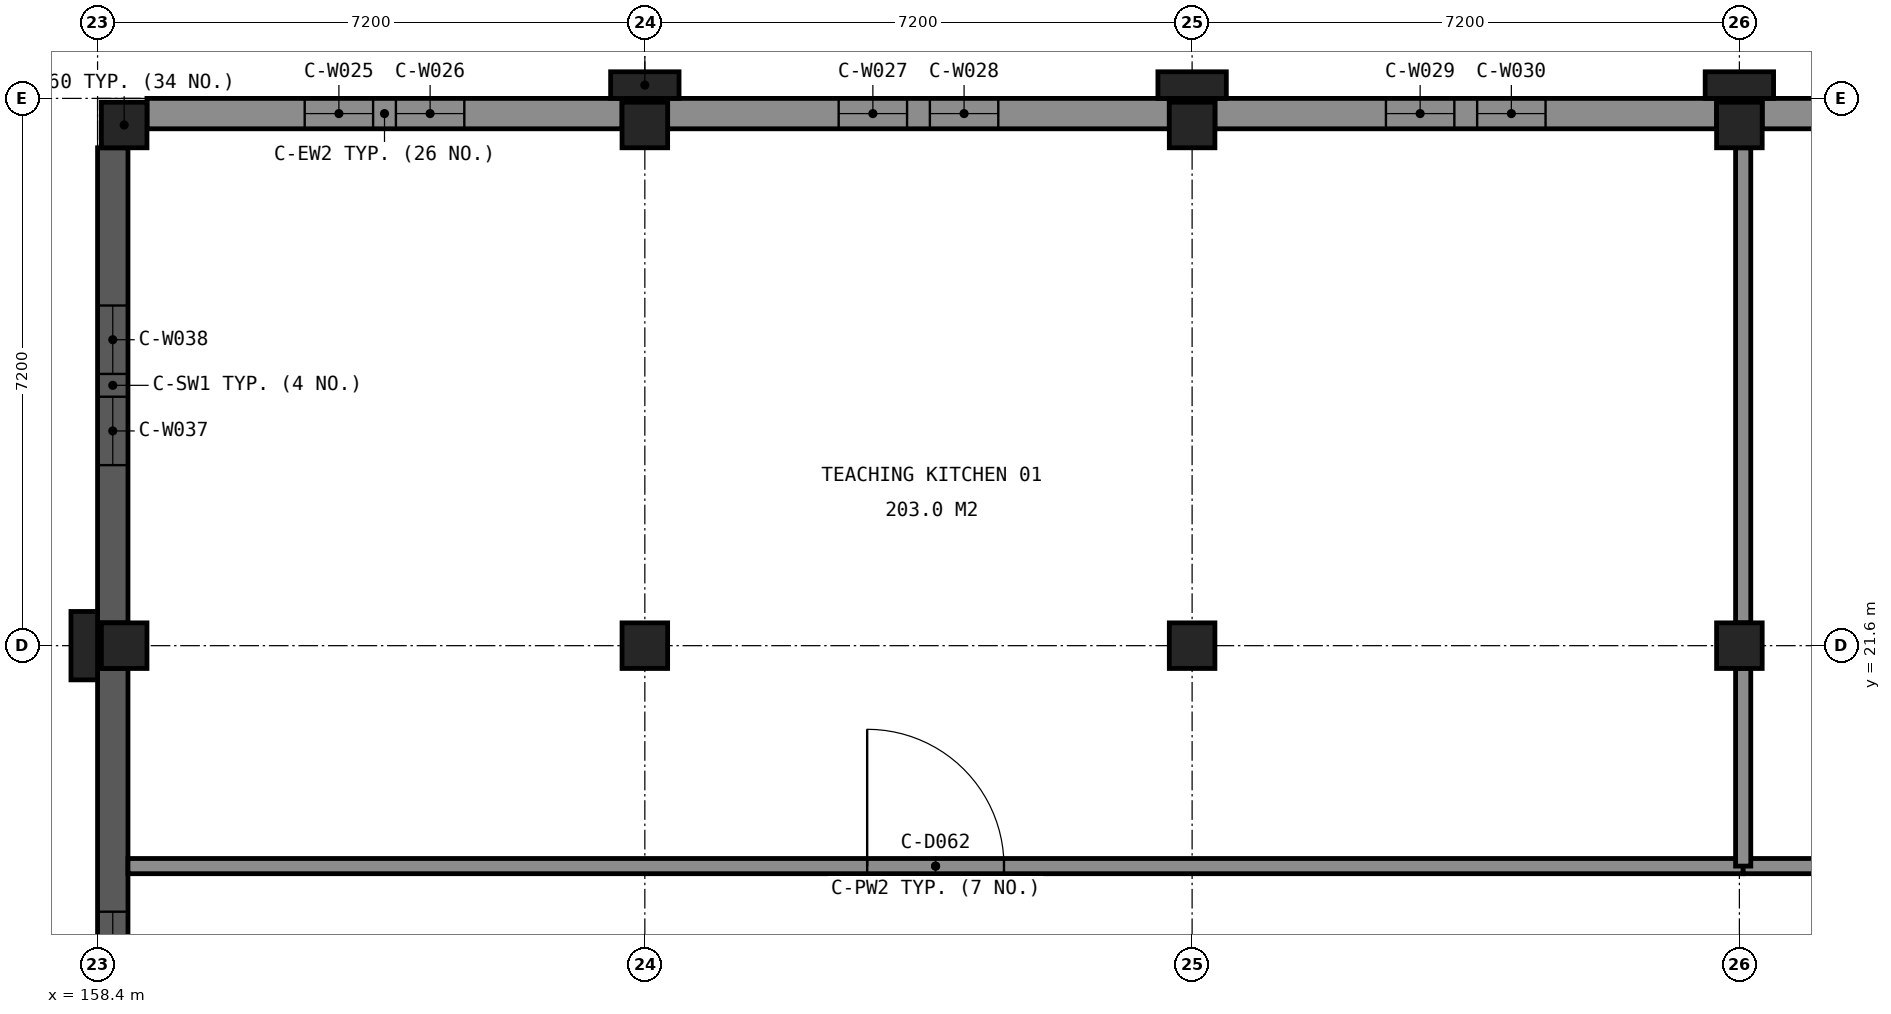
"""IFC4 building model, lengths in metres.
Left out: names, types, materials, properties, quantities, classifications, styles, units other than length and angle.
Written with IfcOpenShell. Run it as: python <this file> out.ifc"""

import sys

from ifc_helpers import new_model, si_unit, direction, frame, frame_2d, origin, origin_2d, place, context, subcontext, project, spatial, rectangle, extrude, element, fill, save


model = new_model("IFC4")
c1 = context("Model", 3, precision=1e-05, world=origin(), true_north=direction((0.0, 1.0)))
c2 = subcontext(c1, "Body", "Model", "MODEL_VIEW")
j1 = project(units=[si_unit("LENGTHUNIT", "METRE"), si_unit("PLANEANGLEUNIT", "RADIAN")], contexts=[c1])
p1 = place(None, origin())
s1 = spatial("IfcSite", under=j1, at=p1, CompositionType="ELEMENT")
p2 = place(p1, origin())
s2 = spatial("IfcBuilding", under=s1, at=p2, CompositionType="ELEMENT")
p3 = place(p2, frame((0.0, 0.0, 9.6)))
s3 = spatial("IfcBuildingStorey", under=s2, at=p3, CompositionType="ELEMENT", Elevation=9.6)
for number, where, z_axis, x_axis in (
    (1, (158.75, 28.45, 0.0), (0.0, 0.0, 1.0), (1.0, 0.0, 0.0)),
    (2, (165.6, 28.45, 0.0), (0.0, 0.0, 1.0), (1.0, 0.0, 0.0)),
    (3, (172.8, 28.45, 0.0), (0.0, 0.0, 1.0), (1.0, 0.0, 0.0)),
    (4, (180.0, 28.45, 0.0), (0.0, 0.0, 1.0), (1.0, 0.0, 0.0)),
    (5, (158.75, 21.6, 0.0), (0.0, 0.0, 1.0), (1.0, 0.0, 0.0)),
    (6, (165.6, 21.6, 0.0), (0.0, 0.0, 1.0), (1.0, 0.0, 0.0)),
    (7, (172.8, 21.6, 0.0), (0.0, 0.0, 1.0), (1.0, 0.0, 0.0)),
    (8, (180.0, 21.6, 0.0), (0.0, 0.0, 1.0), (1.0, 0.0, 0.0)),
):
    element("IfcColumn", number, at=place(p3, frame(where, z_axis=z_axis, x_axis=x_axis)), inside=s3, PredefinedType="COLUMN", context=c2, shape_type="SweptSolid", body=[
        extrude(rectangle(XDim=0.6, YDim=0.6, at=origin_2d()), origin(), (0.0, 0.0, 1.0), 4.8),
    ])
p4 = place(p3, frame((159.05, 28.6, 0.0), z_axis=(0.0, 0.0, 1.0), x_axis=(1.0, 0.0, 0.0)))
e9 = element("IfcWall", 9, at=p4, inside=s3, PredefinedType="SOLIDWALL", context=c2, shape_type="SweptSolid", body=[
    extrude(rectangle(XDim=6.25, YDim=0.4, at=frame_2d((3.125, 0.0))), origin(), (0.0, 0.0, 1.0), 3.95),
])
p5 = place(p4, frame((2.075, 0.0, 0.9)))
e10 = element("IfcOpeningElement", 10, at=p5, cuts=e9, PredefinedType="OPENING", context=c2, shape_type="SweptSolid", body=[
    extrude(rectangle(XDim=0.9, YDim=2.7, at=frame_2d((0.45, 1.35))), frame((0.0, 0.21, 0.0), z_axis=(0.0, -1.0, 0.0), x_axis=(1.0, 0.0, 0.0)), (0.0, 0.0, 1.0), 0.42),
])
p6 = place(p4, frame((3.275, 0.0, 0.9)))
e11 = element("IfcOpeningElement", 11, at=p6, cuts=e9, PredefinedType="OPENING", context=c2, shape_type="SweptSolid", body=[
    extrude(rectangle(XDim=0.9, YDim=2.7, at=frame_2d((0.45, 1.35))), frame((0.0, 0.21, 0.0), z_axis=(0.0, -1.0, 0.0), x_axis=(1.0, 0.0, 0.0)), (0.0, 0.0, 1.0), 0.42),
])
p7 = place(p3, frame((165.9, 28.6, 0.0), z_axis=(0.0, 0.0, 1.0), x_axis=(1.0, 0.0, 0.0)))
e12 = element("IfcWall", 12, at=p7, inside=s3, PredefinedType="SOLIDWALL", context=c2, shape_type="SweptSolid", body=[
    extrude(rectangle(XDim=6.6, YDim=0.4, at=frame_2d((3.3, 0.0))), origin(), (0.0, 0.0, 1.0), 3.95),
])
p8 = place(p7, frame((2.25, 0.0, 0.9)))
e13 = element("IfcOpeningElement", 13, at=p8, cuts=e12, PredefinedType="OPENING", context=c2, shape_type="SweptSolid", body=[
    extrude(rectangle(XDim=0.9, YDim=2.7, at=frame_2d((0.45, 1.35))), frame((0.0, 0.21, 0.0), z_axis=(0.0, -1.0, 0.0), x_axis=(1.0, 0.0, 0.0)), (0.0, 0.0, 1.0), 0.42),
])
p9 = place(p7, frame((3.45, 0.0, 0.9)))
e14 = element("IfcOpeningElement", 14, at=p9, cuts=e12, PredefinedType="OPENING", context=c2, shape_type="SweptSolid", body=[
    extrude(rectangle(XDim=0.9, YDim=2.7, at=frame_2d((0.45, 1.35))), frame((0.0, 0.21, 0.0), z_axis=(0.0, -1.0, 0.0), x_axis=(1.0, 0.0, 0.0)), (0.0, 0.0, 1.0), 0.42),
])
p10 = place(p3, frame((173.1, 28.6, 0.0), z_axis=(0.0, 0.0, 1.0), x_axis=(1.0, 0.0, 0.0)))
e15 = element("IfcWall", 15, at=p10, inside=s3, PredefinedType="SOLIDWALL", context=c2, shape_type="SweptSolid", body=[
    extrude(rectangle(XDim=6.6, YDim=0.4, at=frame_2d((3.3, 0.0))), origin(), (0.0, 0.0, 1.0), 3.95),
])
p11 = place(p10, frame((2.25, 0.0, 0.9)))
e16 = element("IfcOpeningElement", 16, at=p11, cuts=e15, PredefinedType="OPENING", context=c2, shape_type="SweptSolid", body=[
    extrude(rectangle(XDim=0.9, YDim=2.7, at=frame_2d((0.45, 1.35))), frame((0.0, 0.21, 0.0), z_axis=(0.0, -1.0, 0.0), x_axis=(1.0, 0.0, 0.0)), (0.0, 0.0, 1.0), 0.42),
])
p12 = place(p10, frame((3.45, 0.0, 0.9)))
e17 = element("IfcOpeningElement", 17, at=p12, cuts=e15, PredefinedType="OPENING", context=c2, shape_type="SweptSolid", body=[
    extrude(rectangle(XDim=0.9, YDim=2.7, at=frame_2d((0.45, 1.35))), frame((0.0, 0.21, 0.0), z_axis=(0.0, -1.0, 0.0), x_axis=(1.0, 0.0, 0.0)), (0.0, 0.0, 1.0), 0.42),
])
p13 = place(p3, frame((180.3, 28.6, 0.0), z_axis=(0.0, 0.0, 1.0), x_axis=(1.0, 0.0, 0.0)))
e18 = element("IfcWall", 18, at=p13, inside=s3, PredefinedType="SOLIDWALL", context=c2, shape_type="SweptSolid", body=[
    extrude(rectangle(XDim=6.6, YDim=0.4, at=frame_2d((3.3, 0.0))), origin(), (0.0, 0.0, 1.0), 3.95),
])
p14 = place(p13, frame((2.25, 0.0, 0.9)))
e19 = element("IfcOpeningElement", 19, at=p14, cuts=e18, PredefinedType="OPENING", context=c2, shape_type="SweptSolid", body=[
    extrude(rectangle(XDim=0.9, YDim=2.7, at=frame_2d((0.45, 1.35))), frame((0.0, 0.21, 0.0), z_axis=(0.0, -1.0, 0.0), x_axis=(1.0, 0.0, 0.0)), (0.0, 0.0, 1.0), 0.42),
])
p15 = place(p13, frame((3.45, 0.0, 0.9)))
e20 = element("IfcOpeningElement", 20, at=p15, cuts=e18, PredefinedType="OPENING", context=c2, shape_type="SweptSolid", body=[
    extrude(rectangle(XDim=0.9, YDim=2.7, at=frame_2d((0.45, 1.35))), frame((0.0, 0.21, 0.0), z_axis=(0.0, -1.0, 0.0), x_axis=(1.0, 0.0, 0.0)), (0.0, 0.0, 1.0), 0.42),
])
p16 = place(p3, frame((158.6, 21.9, 0.0), z_axis=(0.0, 0.0, 1.0), x_axis=(0.0, 1.0, 0.0)))
e21 = element("IfcWall", 21, at=p16, inside=s3, PredefinedType="SHEAR", context=c2, shape_type="SweptSolid", body=[
    extrude(rectangle(XDim=6.25, YDim=0.4, at=frame_2d((3.125, 0.0))), origin(), (0.0, 0.0, 1.0), 3.95),
])
p17 = place(p16, frame((2.075, 0.0, 0.9)))
e22 = element("IfcOpeningElement", 22, at=p17, cuts=e21, PredefinedType="OPENING", context=c2, shape_type="SweptSolid", body=[
    extrude(rectangle(XDim=0.9, YDim=2.7, at=frame_2d((0.45, 1.35))), frame((0.0, 0.21, 0.0), z_axis=(0.0, -1.0, 0.0), x_axis=(1.0, 0.0, 0.0)), (0.0, 0.0, 1.0), 0.42),
])
p18 = place(p16, frame((3.275, 0.0, 0.9)))
e23 = element("IfcOpeningElement", 23, at=p18, cuts=e21, PredefinedType="OPENING", context=c2, shape_type="SweptSolid", body=[
    extrude(rectangle(XDim=0.9, YDim=2.7, at=frame_2d((0.45, 1.35))), frame((0.0, 0.21, 0.0), z_axis=(0.0, -1.0, 0.0), x_axis=(1.0, 0.0, 0.0)), (0.0, 0.0, 1.0), 0.42),
])
p19 = place(p3, frame((158.6, 15.2, 0.0), z_axis=(0.0, 0.0, 1.0), x_axis=(0.0, 1.0, 0.0)))
e24 = element("IfcWall", 24, at=p19, inside=s3, PredefinedType="SHEAR", context=c2, shape_type="SweptSolid", body=[
    extrude(rectangle(XDim=6.1, YDim=0.4, at=frame_2d((3.05, 0.0))), origin(), (0.0, 0.0, 1.0), 3.95),
])
p20 = place(p19, frame((2.0, 0.0, 0.9)))
e25 = element("IfcOpeningElement", 25, at=p20, cuts=e24, PredefinedType="OPENING", context=c2, shape_type="SweptSolid", body=[
    extrude(rectangle(XDim=0.9, YDim=2.7, at=frame_2d((0.45, 1.35))), frame((0.0, 0.21, 0.0), z_axis=(0.0, -1.0, 0.0), x_axis=(1.0, 0.0, 0.0)), (0.0, 0.0, 1.0), 0.42),
])
for number, where, z_axis, x_axis in (
    (26, (165.6, 28.975, 0.0), (0.0, 0.0, 1.0), (1.0, 0.0, 0.0)),
    (27, (172.8, 28.975, 0.0), (0.0, 0.0, 1.0), (1.0, 0.0, 0.0)),
    (28, (180.0, 28.975, 0.0), (0.0, 0.0, 1.0), (1.0, 0.0, 0.0)),
    (29, (158.225, 21.6, 0.0), (0.0, 0.0, 1.0), (0.0, 1.0, 0.0)),
):
    element("IfcColumn", number, at=place(p3, frame(where, z_axis=z_axis, x_axis=x_axis)), inside=s3, PredefinedType="PILASTER", context=c2, shape_type="SweptSolid", body=[
        extrude(rectangle(XDim=0.9, YDim=0.35, at=origin_2d()), origin(), (0.0, 0.0, 1.0), 4.8),
    ])
p21 = place(p3, frame((158.8, 18.7, 0.0), z_axis=(0.0, 0.0, 1.0), x_axis=(1.0, 0.0, 0.0)))
e30 = element("IfcWall", 30, at=p21, inside=s3, PredefinedType="PARTITIONING", context=c2, shape_type="SweptSolid", body=[
    extrude(rectangle(XDim=21.25, YDim=0.2, at=frame_2d((10.625, 0.0))), origin(), (0.0, 0.0, 1.0), 3.95),
])
p22 = place(p21, frame((9.725, 0.0, 0.0)))
e31 = element("IfcOpeningElement", 31, at=p22, cuts=e30, PredefinedType="OPENING", context=c2, shape_type="SweptSolid", body=[
    extrude(rectangle(XDim=1.8, YDim=2.1, at=frame_2d((0.9, 1.05))), frame((0.0, 0.11, 0.0), z_axis=(0.0, -1.0, 0.0), x_axis=(1.0, 0.0, 0.0)), (0.0, 0.0, 1.0), 0.22),
])
p23 = place(p3, frame((180.05, 18.7, 0.0), z_axis=(0.0, 0.0, 1.0), x_axis=(1.0, 0.0, 0.0)))
e32 = element("IfcWall", 32, at=p23, inside=s3, PredefinedType="PARTITIONING", context=c2, shape_type="SweptSolid", body=[
    extrude(rectangle(XDim=21.25, YDim=0.2, at=frame_2d((10.625, 0.0))), origin(), (0.0, 0.0, 1.0), 3.95),
])
p24 = place(p23, frame((9.725, 0.0, 0.0)))
e33 = element("IfcOpeningElement", 33, at=p24, cuts=e32, PredefinedType="OPENING", context=c2, shape_type="SweptSolid", body=[
    extrude(rectangle(XDim=1.8, YDim=2.1, at=frame_2d((0.9, 1.05))), frame((0.0, 0.11, 0.0), z_axis=(0.0, -1.0, 0.0), x_axis=(1.0, 0.0, 0.0)), (0.0, 0.0, 1.0), 0.22),
])
p25 = place(p3, frame((180.05, 28.15, 0.0), z_axis=(0.0, 0.0, 1.0), x_axis=(0.0, -1.0, 0.0)))
e34 = element("IfcWall", 34, at=p25, inside=s3, PredefinedType="PARTITIONING", context=c2, shape_type="SweptSolid", body=[
    extrude(rectangle(XDim=6.25, YDim=0.2, at=frame_2d((3.125, 0.0))), origin(), (0.0, 0.0, 1.0), 3.95),
])
p26 = place(p3, frame((180.05, 21.3, 0.0), z_axis=(0.0, 0.0, 1.0), x_axis=(0.0, -1.0, 0.0)))
e35 = element("IfcWall", 35, at=p26, inside=s3, PredefinedType="PARTITIONING", context=c2, shape_type="SweptSolid", body=[
    extrude(rectangle(XDim=2.6, YDim=0.2, at=frame_2d((1.3, 0.0))), origin(), (0.0, 0.0, 1.0), 3.95),
])
p27 = place(p5, origin())
e36 = element("IfcWindow", 36, at=p27, inside=s3, PartitioningType="SINGLE_PANEL", PredefinedType="WINDOW", context=c2, shape_type="SweptSolid", body=[
    extrude(rectangle(XDim=0.9, YDim=2.7, at=frame_2d((0.45, 1.35))), frame((0.0, -0.09, 0.0), z_axis=(0.0, -1.0, 0.0), x_axis=(1.0, 0.0, 0.0)), (0.0, 0.0, 1.0), 0.06),
])
fill(e10, e36)
p28 = place(p6, origin())
e37 = element("IfcWindow", 37, at=p28, inside=s3, PartitioningType="SINGLE_PANEL", PredefinedType="WINDOW", context=c2, shape_type="SweptSolid", body=[
    extrude(rectangle(XDim=0.9, YDim=2.7, at=frame_2d((0.45, 1.35))), frame((0.0, -0.09, 0.0), z_axis=(0.0, -1.0, 0.0), x_axis=(1.0, 0.0, 0.0)), (0.0, 0.0, 1.0), 0.06),
])
fill(e11, e37)
p29 = place(p8, origin())
e38 = element("IfcWindow", 38, at=p29, inside=s3, PartitioningType="SINGLE_PANEL", PredefinedType="WINDOW", context=c2, shape_type="SweptSolid", body=[
    extrude(rectangle(XDim=0.9, YDim=2.7, at=frame_2d((0.45, 1.35))), frame((0.0, -0.09, 0.0), z_axis=(0.0, -1.0, 0.0), x_axis=(1.0, 0.0, 0.0)), (0.0, 0.0, 1.0), 0.06),
])
fill(e13, e38)
p30 = place(p9, origin())
e39 = element("IfcWindow", 39, at=p30, inside=s3, PartitioningType="SINGLE_PANEL", PredefinedType="WINDOW", context=c2, shape_type="SweptSolid", body=[
    extrude(rectangle(XDim=0.9, YDim=2.7, at=frame_2d((0.45, 1.35))), frame((0.0, -0.09, 0.0), z_axis=(0.0, -1.0, 0.0), x_axis=(1.0, 0.0, 0.0)), (0.0, 0.0, 1.0), 0.06),
])
fill(e14, e39)
p31 = place(p11, origin())
e40 = element("IfcWindow", 40, at=p31, inside=s3, PartitioningType="SINGLE_PANEL", PredefinedType="WINDOW", context=c2, shape_type="SweptSolid", body=[
    extrude(rectangle(XDim=0.9, YDim=2.7, at=frame_2d((0.45, 1.35))), frame((0.0, -0.09, 0.0), z_axis=(0.0, -1.0, 0.0), x_axis=(1.0, 0.0, 0.0)), (0.0, 0.0, 1.0), 0.06),
])
fill(e16, e40)
p32 = place(p12, origin())
e41 = element("IfcWindow", 41, at=p32, inside=s3, PartitioningType="SINGLE_PANEL", PredefinedType="WINDOW", context=c2, shape_type="SweptSolid", body=[
    extrude(rectangle(XDim=0.9, YDim=2.7, at=frame_2d((0.45, 1.35))), frame((0.0, -0.09, 0.0), z_axis=(0.0, -1.0, 0.0), x_axis=(1.0, 0.0, 0.0)), (0.0, 0.0, 1.0), 0.06),
])
fill(e17, e41)
p33 = place(p17, origin())
e42 = element("IfcWindow", 42, at=p33, inside=s3, PartitioningType="SINGLE_PANEL", PredefinedType="WINDOW", context=c2, shape_type="SweptSolid", body=[
    extrude(rectangle(XDim=0.9, YDim=2.7, at=frame_2d((0.45, 1.35))), frame((0.0, -0.09, 0.0), z_axis=(0.0, -1.0, 0.0), x_axis=(1.0, 0.0, 0.0)), (0.0, 0.0, 1.0), 0.06),
])
fill(e22, e42)
p34 = place(p18, origin())
e43 = element("IfcWindow", 43, at=p34, inside=s3, PartitioningType="SINGLE_PANEL", PredefinedType="WINDOW", context=c2, shape_type="SweptSolid", body=[
    extrude(rectangle(XDim=0.9, YDim=2.7, at=frame_2d((0.45, 1.35))), frame((0.0, -0.09, 0.0), z_axis=(0.0, -1.0, 0.0), x_axis=(1.0, 0.0, 0.0)), (0.0, 0.0, 1.0), 0.06),
])
fill(e23, e43)
p35 = place(p20, origin())
e44 = element("IfcWindow", 44, at=p35, inside=s3, PartitioningType="SINGLE_PANEL", PredefinedType="WINDOW", context=c2, shape_type="SweptSolid", body=[
    extrude(rectangle(XDim=0.9, YDim=2.7, at=frame_2d((0.45, 1.35))), frame((0.0, -0.09, 0.0), z_axis=(0.0, -1.0, 0.0), x_axis=(1.0, 0.0, 0.0)), (0.0, 0.0, 1.0), 0.06),
])
fill(e25, e44)
p36 = place(p22, origin())
e45 = element("IfcDoor", 45, at=p36, inside=s3, OperationType="NOTDEFINED", PredefinedType="DOOR", context=c2, shape_type="SweptSolid", body=[
    extrude(rectangle(XDim=1.8, YDim=2.1, at=frame_2d((0.9, 1.05))), frame((0.0, 0.025, 0.0), z_axis=(0.0, -1.0, 0.0), x_axis=(1.0, 0.0, 0.0)), (0.0, 0.0, 1.0), 0.05),
])
fill(e31, e45)
save(model, sys.argv[1])
